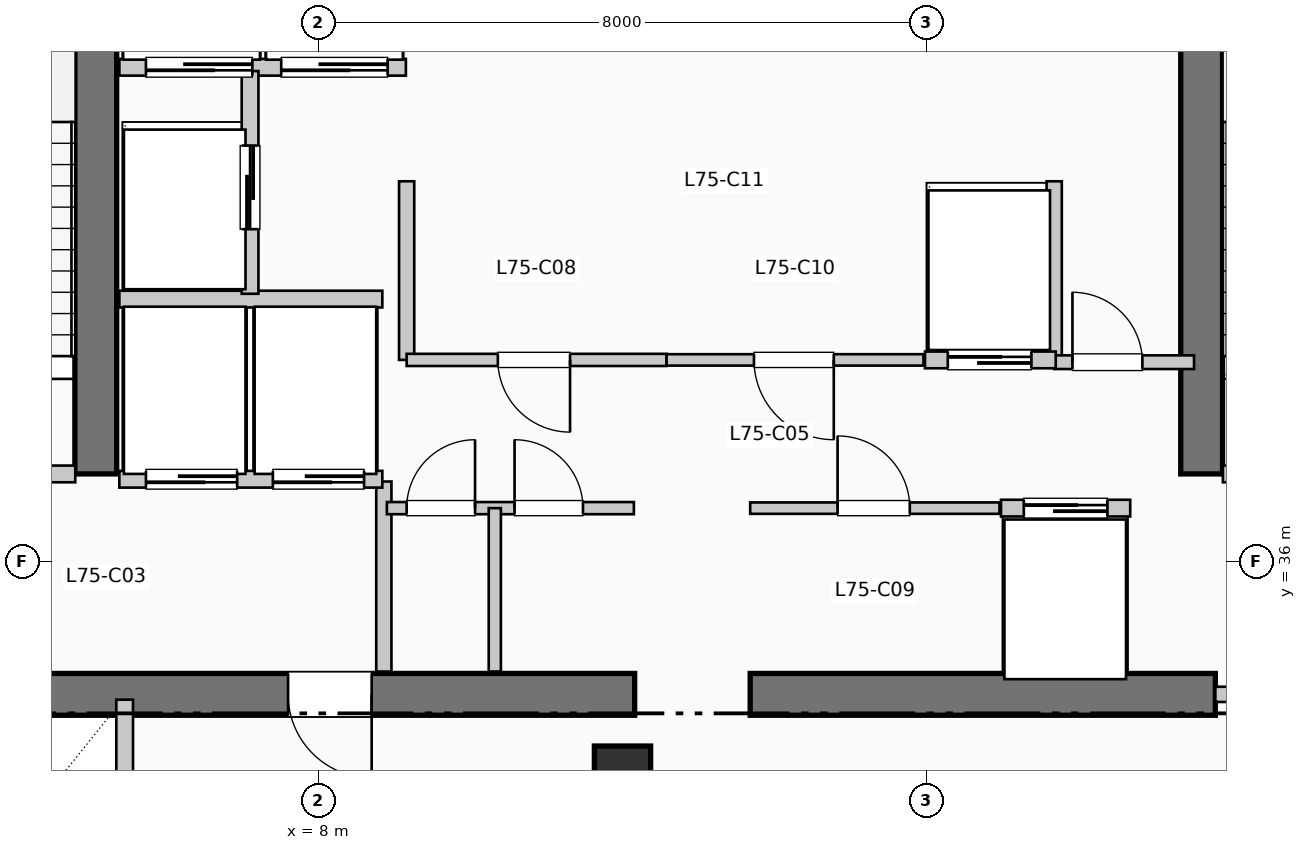
"""IFC4 building model, lengths in metres.
Left out: names, types, materials, properties, quantities, classifications, styles, units other than length and angle.
Written with IfcOpenShell. Run it as: python <this file> out.ifc"""

import sys

from ifc_helpers import new_model, si_unit, direction, frame, frame_2d, origin, origin_2d, place, context, subcontext, project, spatial, rectangle, extrude, element, fill, save


model = new_model("IFC4")
c1 = context("Model", 3, precision=1e-05, world=origin(), true_north=direction((0.0, 1.0)))
c2 = subcontext(c1, "Body", "Model", "MODEL_VIEW")
j1 = project(units=[si_unit("LENGTHUNIT", "METRE"), si_unit("PLANEANGLEUNIT", "RADIAN")], contexts=[c1])
p1 = place(None, origin())
s1 = spatial("IfcSite", under=j1, at=p1, CompositionType="ELEMENT")
p2 = place(p1, origin())
s2 = spatial("IfcBuilding", under=s1, at=p2, CompositionType="ELEMENT")
p3 = place(p2, frame((0.0, 0.0, 307.89)))
s3 = spatial("IfcBuildingStorey", under=s2, at=p3, CompositionType="ELEMENT", Elevation=307.89)
p4 = place(p3, frame((1.45, 34.25, 0.0), z_axis=(0.0, 0.0, 1.0), x_axis=(1.0, 0.0, 0.0)))
e1 = element("IfcWall", 1, at=p4, inside=s3, PredefinedType="SHEAR", context=c2, shape_type="SweptSolid", body=[
    extrude(rectangle(XDim=10.71, YDim=0.55, at=frame_2d((5.355, 0.0))), origin(), (0.0, 0.0, 1.0), 3.96),
])
p5 = place(p4, frame((7.25, 0.0, 0.0), z_axis=(0.0, 0.0, 1.0), x_axis=(-1.0, 0.0, 0.0)))
e2 = element("IfcOpeningElement", 2, at=p5, cuts=e1, PredefinedType="OPENING", context=c2, shape_type="SweptSolid", body=[
    extrude(rectangle(XDim=1.1, YDim=2.15, at=frame_2d((0.55, 1.075))), frame((0.0, 0.285, 0.0), z_axis=(0.0, -1.0, 0.0), x_axis=(1.0, 0.0, 0.0)), (0.0, 0.0, 1.0), 0.57),
])
p6 = place(p3, frame((13.68, 34.25, 0.0), z_axis=(0.0, 0.0, 1.0), x_axis=(1.0, 0.0, 0.0)))
e3 = element("IfcWall", 3, at=p6, inside=s3, PredefinedType="SHEAR", context=c2, shape_type="SweptSolid", body=[
    extrude(rectangle(XDim=6.12, YDim=0.55, at=frame_2d((3.06, 0.0))), origin(), (0.0, 0.0, 1.0), 3.96),
])
for number, where, z_axis, x_axis in (
    (4, (5.07, 37.15, 0.0), (0.0, 0.0, 1.0), (0.0, 1.0, 0.0)),
    (5, (19.62, 37.15, 0.0), (0.0, 0.0, 1.0), (0.0, 1.0, 0.0)),
):
    element("IfcWall", number, at=place(p3, frame(where, z_axis=z_axis, x_axis=x_axis)), inside=s3, PredefinedType="SHEAR", context=c2, shape_type="SweptSolid", body=[
        extrude(rectangle(XDim=7.89, YDim=0.55, at=frame_2d((3.945, 0.0))), origin(), (0.0, 0.0, 1.0), 3.96),
    ])
p7 = place(p3, frame((12.0, 33.2, 0.0), z_axis=(0.0, 0.0, 1.0), x_axis=(1.0, 0.0, 0.0)))
e6 = element("IfcColumn", 6, at=p7, inside=s3, PredefinedType="COLUMN", context=c2, shape_type="SweptSolid", body=[
    extrude(rectangle(XDim=0.74, YDim=0.74, at=origin_2d()), origin(), (0.0, 0.0, 1.0), 3.96),
])
p8 = place(p3, frame((1.65, 37.15, 0.0), z_axis=(0.0, 0.0, 1.0), x_axis=(1.0, 0.0, 0.0)))
e7 = element("IfcWall", 7, at=p8, inside=s3, PredefinedType="PARTITIONING", context=c2, shape_type="SweptSolid", body=[
    extrude(rectangle(XDim=3.15, YDim=0.22, at=frame_2d((1.575, 0.0))), origin(), (0.0, 0.0, 1.0), 3.74),
])
p9 = place(p8, frame((2.05, 0.0, 0.0), z_axis=(0.0, 0.0, 1.0), x_axis=(-1.0, 0.0, 0.0)))
e8 = element("IfcOpeningElement", 8, at=p9, cuts=e7, PredefinedType="OPENING", context=c2, shape_type="SweptSolid", body=[
    extrude(rectangle(XDim=1.05, YDim=2.15, at=frame_2d((0.525, 1.075))), frame((0.0, 0.12, 0.0), z_axis=(0.0, -1.0, 0.0), x_axis=(1.0, 0.0, 0.0)), (0.0, 0.0, 1.0), 0.24),
])
p10 = place(p3, frame((8.86, 34.55, 0.0), z_axis=(0.0, 0.0, 1.0), x_axis=(0.0, 1.0, 0.0)))
e9 = element("IfcWall", 9, at=p10, inside=s3, PredefinedType="PARTITIONING", context=c2, shape_type="SweptSolid", body=[
    extrude(rectangle(XDim=2.5, YDim=0.2, at=frame_2d((1.25, 0.0))), origin(), (0.0, 0.0, 1.0), 3.74),
])
p11 = place(p3, frame((19.9, 37.15, 0.0), z_axis=(0.0, 0.0, 1.0), x_axis=(1.0, 0.0, 0.0)))
e10 = element("IfcWall", 10, at=p11, inside=s3, PredefinedType="PARTITIONING", context=c2, shape_type="SweptSolid", body=[
    extrude(rectangle(XDim=3.15, YDim=0.22, at=frame_2d((1.575, 0.0))), origin(), (0.0, 0.0, 1.0), 3.74),
])
p12 = place(p11, frame((2.05, 0.0, 0.0), z_axis=(0.0, 0.0, 1.0), x_axis=(-1.0, 0.0, 0.0)))
e11 = element("IfcOpeningElement", 11, at=p12, cuts=e10, PredefinedType="OPENING", context=c2, shape_type="SweptSolid", body=[
    extrude(rectangle(XDim=1.05, YDim=2.15, at=frame_2d((0.525, 1.075))), frame((0.0, 0.12, 0.0), z_axis=(0.0, -1.0, 0.0), x_axis=(1.0, 0.0, 0.0)), (0.0, 0.0, 1.0), 0.24),
])
p13 = place(p3, frame((19.8, 34.25, 0.0), z_axis=(0.0, 0.0, 1.0), x_axis=(1.0, 0.0, 0.0)))
e12 = element("IfcWall", 12, at=p13, inside=s3, PredefinedType="PARTITIONING", context=c2, shape_type="SweptSolid", body=[
    extrude(rectangle(XDim=3.25, YDim=0.2, at=frame_2d((1.625, 0.0))), origin(), (0.0, 0.0, 1.0), 3.74),
])
p14 = place(p13, frame((2.15, 0.0, 0.0), z_axis=(0.0, 0.0, 1.0), x_axis=(-1.0, 0.0, 0.0)))
e13 = element("IfcOpeningElement", 13, at=p14, cuts=e12, PredefinedType="OPENING", context=c2, shape_type="SweptSolid", body=[
    extrude(rectangle(XDim=1.1, YDim=2.15, at=frame_2d((0.55, 1.075))), frame((0.0, 0.11, 0.0), z_axis=(0.0, -1.0, 0.0), x_axis=(1.0, 0.0, 0.0)), (0.0, 0.0, 1.0), 0.22),
])
p15 = place(p3, frame((5.38, 37.08, 0.0), z_axis=(0.0, 0.0, 1.0), x_axis=(1.0, 0.0, 0.0)))
e14 = element("IfcWall", 14, at=p15, inside=s3, PredefinedType="PARTITIONING", context=c2, shape_type="SweptSolid", body=[
    extrude(rectangle(XDim=3.46, YDim=0.22, at=frame_2d((1.73, 0.0))), origin(), (0.0, 0.0, 1.0), 3.74),
])
p16 = place(p15, frame((1.55, 0.0, 0.0), z_axis=(0.0, 0.0, 1.0), x_axis=(-1.0, 0.0, 0.0)))
e15 = element("IfcOpeningElement", 15, at=p16, cuts=e14, PredefinedType="OPENING", context=c2, shape_type="SweptSolid", body=[
    extrude(rectangle(XDim=1.2, YDim=2.2, at=frame_2d((0.6, 1.1))), frame((0.0, 0.12, 0.0), z_axis=(0.0, -1.0, 0.0), x_axis=(1.0, 0.0, 0.0)), (0.0, 0.0, 1.0), 0.24),
])
p17 = place(p15, frame((3.22, 0.0, 0.0), z_axis=(0.0, 0.0, 1.0), x_axis=(-1.0, 0.0, 0.0)))
e16 = element("IfcOpeningElement", 16, at=p17, cuts=e14, PredefinedType="OPENING", context=c2, shape_type="SweptSolid", body=[
    extrude(rectangle(XDim=1.2, YDim=2.2, at=frame_2d((0.6, 1.1))), frame((0.0, 0.12, 0.0), z_axis=(0.0, -1.0, 0.0), x_axis=(1.0, 0.0, 0.0)), (0.0, 0.0, 1.0), 0.24),
])
p18 = place(p3, frame((5.38, 39.45, 0.0), z_axis=(0.0, 0.0, 1.0), x_axis=(1.0, 0.0, 0.0)))
e17 = element("IfcWall", 17, at=p18, inside=s3, PredefinedType="PARTITIONING", context=c2, shape_type="SweptSolid", body=[
    extrude(rectangle(XDim=3.46, YDim=0.22, at=frame_2d((1.73, 0.0))), origin(), (0.0, 0.0, 1.0), 3.74),
])
p19 = place(p3, frame((5.38, 42.5, 0.0), z_axis=(0.0, 0.0, 1.0), x_axis=(1.0, 0.0, 0.0)))
e18 = element("IfcWall", 18, at=p19, inside=s3, PredefinedType="PARTITIONING", context=c2, shape_type="SweptSolid", body=[
    extrude(rectangle(XDim=3.77, YDim=0.22, at=frame_2d((1.885, 0.0))), origin(), (0.0, 0.0, 1.0), 3.74),
])
p20 = place(p19, frame((1.75, 0.0, 0.0), z_axis=(0.0, 0.0, 1.0), x_axis=(-1.0, 0.0, 0.0)))
e19 = element("IfcOpeningElement", 19, at=p20, cuts=e18, PredefinedType="OPENING", context=c2, shape_type="SweptSolid", body=[
    extrude(rectangle(XDim=1.4, YDim=2.2, at=frame_2d((0.7, 1.1))), frame((0.0, 0.12, 0.0), z_axis=(0.0, -1.0, 0.0), x_axis=(1.0, 0.0, 0.0)), (0.0, 0.0, 1.0), 0.24),
])
p21 = place(p19, frame((3.53, 0.0, 0.0), z_axis=(0.0, 0.0, 1.0), x_axis=(-1.0, 0.0, 0.0)))
e20 = element("IfcOpeningElement", 20, at=p21, cuts=e18, PredefinedType="OPENING", context=c2, shape_type="SweptSolid", body=[
    extrude(rectangle(XDim=1.4, YDim=2.2, at=frame_2d((0.7, 1.1))), frame((0.0, 0.12, 0.0), z_axis=(0.0, -1.0, 0.0), x_axis=(1.0, 0.0, 0.0)), (0.0, 0.0, 1.0), 0.24),
])
p22 = place(p3, frame((7.1, 39.52, 0.0), z_axis=(0.0, 0.0, 1.0), x_axis=(0.0, 1.0, 0.0)))
e21 = element("IfcWall", 21, at=p22, inside=s3, PredefinedType="PARTITIONING", context=c2, shape_type="SweptSolid", body=[
    extrude(rectangle(XDim=2.93, YDim=0.22, at=frame_2d((1.465, 0.0))), origin(), (0.0, 0.0, 1.0), 3.74),
])
p23 = place(p22, frame((0.85, 0.0, 0.0)))
e22 = element("IfcOpeningElement", 22, at=p23, cuts=e21, PredefinedType="OPENING", context=c2, shape_type="SweptSolid", body=[
    extrude(rectangle(XDim=1.1, YDim=2.2, at=frame_2d((0.55, 1.1))), frame((0.0, 0.12, 0.0), z_axis=(0.0, -1.0, 0.0), x_axis=(1.0, 0.0, 0.0)), (0.0, 0.0, 1.0), 0.24),
])
p24 = place(p3, frame((5.45, 31.8, 0.0), z_axis=(0.0, 0.0, 1.0), x_axis=(0.0, 1.0, 0.0)))
e23 = element("IfcWall", 23, at=p24, inside=s3, PredefinedType="PARTITIONING", context=c2, shape_type="SweptSolid", body=[
    extrude(rectangle(XDim=2.38, YDim=0.22, at=frame_2d((1.19, 0.0))), origin(), (0.0, 0.0, 1.0), 3.74),
])
for number, where, z_axis, x_axis in (
    (24, (9.16, 38.65, 0.0), (0.0, 0.0, 1.0), (0.0, 1.0, 0.0)),
    (25, (17.68, 38.65, 0.0), (0.0, 0.0, 1.0), (0.0, 1.0, 0.0)),
):
    element("IfcWall", number, at=place(p3, frame(where, z_axis=z_axis, x_axis=x_axis)), inside=s3, PredefinedType="PARTITIONING", context=c2, shape_type="SweptSolid", body=[
        extrude(rectangle(XDim=2.35, YDim=0.2, at=frame_2d((1.175, 0.0))), origin(), (0.0, 0.0, 1.0), 3.74),
    ])
p25 = place(p3, frame((17.68, 38.62, 0.0), z_axis=(0.0, 0.0, 1.0), x_axis=(1.0, 0.0, 0.0)))
e26 = element("IfcWall", 26, at=p25, inside=s3, PredefinedType="PARTITIONING", context=c2, shape_type="SweptSolid", body=[
    extrude(rectangle(XDim=1.84, YDim=0.18, at=frame_2d((0.92, 0.0))), origin(), (0.0, 0.0, 1.0), 3.74),
])
p26 = place(p25, frame((0.24, 0.0, 0.0)))
e27 = element("IfcOpeningElement", 27, at=p26, cuts=e26, PredefinedType="OPENING", context=c2, shape_type="SweptSolid", body=[
    extrude(rectangle(XDim=0.92, YDim=2.1, at=frame_2d((0.46, 1.05))), frame((0.0, 0.1, 0.0), z_axis=(0.0, -1.0, 0.0), x_axis=(1.0, 0.0, 0.0)), (0.0, 0.0, 1.0), 0.2),
])
p27 = place(p3, frame((8.9, 36.7, 0.0), z_axis=(0.0, 0.0, 1.0), x_axis=(1.0, 0.0, 0.0)))
e28 = element("IfcWall", 28, at=p27, inside=s3, PredefinedType="PARTITIONING", context=c2, shape_type="SweptSolid", body=[
    extrude(rectangle(XDim=3.25, YDim=0.16, at=frame_2d((1.625, 0.0))), origin(), (0.0, 0.0, 1.0), 3.74),
])
p28 = place(p27, frame((0.26, 0.0, 0.0)))
e29 = element("IfcOpeningElement", 29, at=p28, cuts=e28, PredefinedType="OPENING", context=c2, shape_type="SweptSolid", body=[
    extrude(rectangle(XDim=0.9, YDim=2.15, at=frame_2d((0.45, 1.075))), frame((0.0, 0.09, 0.0), z_axis=(0.0, -1.0, 0.0), x_axis=(1.0, 0.0, 0.0)), (0.0, 0.0, 1.0), 0.18),
])
p29 = place(p27, frame((1.68, 0.0, 0.0)))
e30 = element("IfcOpeningElement", 30, at=p29, cuts=e28, PredefinedType="OPENING", context=c2, shape_type="SweptSolid", body=[
    extrude(rectangle(XDim=0.9, YDim=2.15, at=frame_2d((0.45, 1.075))), frame((0.0, 0.09, 0.0), z_axis=(0.0, -1.0, 0.0), x_axis=(1.0, 0.0, 0.0)), (0.0, 0.0, 1.0), 0.18),
])
p30 = place(p3, frame((10.32, 34.55, 0.0), z_axis=(0.0, 0.0, 1.0), x_axis=(0.0, 1.0, 0.0)))
e31 = element("IfcWall", 31, at=p30, inside=s3, PredefinedType="PARTITIONING", context=c2, shape_type="SweptSolid", body=[
    extrude(rectangle(XDim=2.15, YDim=0.16, at=frame_2d((1.075, 0.0))), origin(), (0.0, 0.0, 1.0), 3.74),
])
p31 = place(p3, frame((9.16, 38.65, 0.0), z_axis=(0.0, 0.0, 1.0), x_axis=(1.0, 0.0, 0.0)))
e32 = element("IfcWall", 32, at=p31, inside=s3, PredefinedType="PARTITIONING", context=c2, shape_type="SweptSolid", body=[
    extrude(rectangle(XDim=3.42, YDim=0.16, at=frame_2d((1.71, 0.0))), origin(), (0.0, 0.0, 1.0), 3.74),
])
p32 = place(p31, frame((2.15, 0.0, 0.0), z_axis=(0.0, 0.0, 1.0), x_axis=(-1.0, 0.0, 0.0)))
e33 = element("IfcOpeningElement", 33, at=p32, cuts=e32, PredefinedType="OPENING", context=c2, shape_type="SweptSolid", body=[
    extrude(rectangle(XDim=0.95, YDim=2.15, at=frame_2d((0.475, 1.075))), frame((0.0, 0.09, 0.0), z_axis=(0.0, -1.0, 0.0), x_axis=(1.0, 0.0, 0.0)), (0.0, 0.0, 1.0), 0.18),
])
p33 = place(p3, frame((13.68, 36.7, 0.0), z_axis=(0.0, 0.0, 1.0), x_axis=(1.0, 0.0, 0.0)))
e34 = element("IfcWall", 34, at=p33, inside=s3, PredefinedType="PARTITIONING", context=c2, shape_type="SweptSolid", body=[
    extrude(rectangle(XDim=3.28, YDim=0.15, at=frame_2d((1.64, 0.0))), origin(), (0.0, 0.0, 1.0), 3.74),
])
p34 = place(p33, frame((1.15, 0.0, 0.0)))
e35 = element("IfcOpeningElement", 35, at=p34, cuts=e34, PredefinedType="OPENING", context=c2, shape_type="SweptSolid", body=[
    extrude(rectangle(XDim=0.95, YDim=2.15, at=frame_2d((0.475, 1.075))), frame((0.0, 0.085, 0.0), z_axis=(0.0, -1.0, 0.0), x_axis=(1.0, 0.0, 0.0)), (0.0, 0.0, 1.0), 0.17),
])
p35 = place(p3, frame((12.58, 38.65, 0.0), z_axis=(0.0, 0.0, 1.0), x_axis=(1.0, 0.0, 0.0)))
e36 = element("IfcWall", 36, at=p35, inside=s3, PredefinedType="PARTITIONING", context=c2, shape_type="SweptSolid", body=[
    extrude(rectangle(XDim=3.38, YDim=0.15, at=frame_2d((1.69, 0.0))), origin(), (0.0, 0.0, 1.0), 3.74),
])
p36 = place(p35, frame((2.2, 0.0, 0.0), z_axis=(0.0, 0.0, 1.0), x_axis=(-1.0, 0.0, 0.0)))
e37 = element("IfcOpeningElement", 37, at=p36, cuts=e36, PredefinedType="OPENING", context=c2, shape_type="SweptSolid", body=[
    extrude(rectangle(XDim=1.05, YDim=2.15, at=frame_2d((0.525, 1.075))), frame((0.0, 0.085, 0.0), z_axis=(0.0, -1.0, 0.0), x_axis=(1.0, 0.0, 0.0)), (0.0, 0.0, 1.0), 0.17),
])
p37 = place(p3, frame((16.98, 36.7, 0.0), z_axis=(0.0, 0.0, 1.0), x_axis=(1.0, 0.0, 0.0)))
e38 = element("IfcWall", 38, at=p37, inside=s3, PredefinedType="PARTITIONING", context=c2, shape_type="SweptSolid", body=[
    extrude(rectangle(XDim=1.7, YDim=0.22, at=frame_2d((0.85, 0.0))), origin(), (0.0, 0.0, 1.0), 3.74),
])
p38 = place(p37, frame((0.3, 0.0, 0.0)))
e39 = element("IfcOpeningElement", 39, at=p38, cuts=e38, PredefinedType="OPENING", context=c2, shape_type="SweptSolid", body=[
    extrude(rectangle(XDim=1.1, YDim=2.2, at=frame_2d((0.55, 1.1))), frame((0.0, 0.12, 0.0), z_axis=(0.0, -1.0, 0.0), x_axis=(1.0, 0.0, 0.0)), (0.0, 0.0, 1.0), 0.24),
])
p39 = place(p3, frame((15.98, 38.65, 0.0), z_axis=(0.0, 0.0, 1.0), x_axis=(1.0, 0.0, 0.0)))
e40 = element("IfcWall", 40, at=p39, inside=s3, PredefinedType="PARTITIONING", context=c2, shape_type="SweptSolid", body=[
    extrude(rectangle(XDim=1.72, YDim=0.22, at=frame_2d((0.86, 0.0))), origin(), (0.0, 0.0, 1.0), 3.74),
])
p40 = place(p39, frame((0.3, 0.0, 0.0)))
e41 = element("IfcOpeningElement", 41, at=p40, cuts=e40, PredefinedType="OPENING", context=c2, shape_type="SweptSolid", body=[
    extrude(rectangle(XDim=1.1, YDim=2.2, at=frame_2d((0.55, 1.1))), frame((0.0, 0.12, 0.0), z_axis=(0.0, -1.0, 0.0), x_axis=(1.0, 0.0, 0.0)), (0.0, 0.0, 1.0), 0.24),
])
p41 = place(p5, origin())
e42 = element("IfcDoor", 42, at=p41, inside=s3, OperationType="SINGLE_SWING_RIGHT", PredefinedType="DOOR", context=c2, shape_type="SweptSolid", body=[
    extrude(rectangle(XDim=1.1, YDim=2.15, at=frame_2d((0.55, 1.075))), frame((0.0, 0.025, 0.0), z_axis=(0.0, -1.0, 0.0), x_axis=(1.0, 0.0, 0.0)), (0.0, 0.0, 1.0), 0.05),
])
fill(e2, e42)
p42 = place(p16, origin())
e43 = element("IfcDoor", 43, at=p42, inside=s3, OperationType="SLIDING_TO_RIGHT", PredefinedType="DOOR", context=c2, shape_type="SweptSolid", body=[
    extrude(rectangle(XDim=1.2, YDim=2.2, at=frame_2d((0.6, 1.1))), frame((0.0, 0.025, 0.0), z_axis=(0.0, -1.0, 0.0), x_axis=(1.0, 0.0, 0.0)), (0.0, 0.0, 1.0), 0.05),
])
fill(e15, e43)
p43 = place(p17, origin())
e44 = element("IfcDoor", 44, at=p43, inside=s3, OperationType="SLIDING_TO_RIGHT", PredefinedType="DOOR", context=c2, shape_type="SweptSolid", body=[
    extrude(rectangle(XDim=1.2, YDim=2.2, at=frame_2d((0.6, 1.1))), frame((0.0, 0.025, 0.0), z_axis=(0.0, -1.0, 0.0), x_axis=(1.0, 0.0, 0.0)), (0.0, 0.0, 1.0), 0.05),
])
fill(e16, e44)
p44 = place(p20, origin())
e45 = element("IfcDoor", 45, at=p44, inside=s3, OperationType="SLIDING_TO_LEFT", PredefinedType="DOOR", context=c2, shape_type="SweptSolid", body=[
    extrude(rectangle(XDim=1.4, YDim=2.2, at=frame_2d((0.7, 1.1))), frame((0.0, 0.025, 0.0), z_axis=(0.0, -1.0, 0.0), x_axis=(1.0, 0.0, 0.0)), (0.0, 0.0, 1.0), 0.05),
])
fill(e19, e45)
p45 = place(p21, origin())
e46 = element("IfcDoor", 46, at=p45, inside=s3, OperationType="SLIDING_TO_LEFT", PredefinedType="DOOR", context=c2, shape_type="SweptSolid", body=[
    extrude(rectangle(XDim=1.4, YDim=2.2, at=frame_2d((0.7, 1.1))), frame((0.0, 0.025, 0.0), z_axis=(0.0, -1.0, 0.0), x_axis=(1.0, 0.0, 0.0)), (0.0, 0.0, 1.0), 0.05),
])
fill(e20, e46)
p46 = place(p23, origin())
e47 = element("IfcDoor", 47, at=p46, inside=s3, OperationType="SLIDING_TO_LEFT", PredefinedType="DOOR", context=c2, shape_type="SweptSolid", body=[
    extrude(rectangle(XDim=1.1, YDim=2.2, at=frame_2d((0.55, 1.1))), frame((0.0, 0.025, 0.0), z_axis=(0.0, -1.0, 0.0), x_axis=(1.0, 0.0, 0.0)), (0.0, 0.0, 1.0), 0.05),
])
fill(e22, e47)
p47 = place(p26, origin())
e48 = element("IfcDoor", 48, at=p47, inside=s3, OperationType="SINGLE_SWING_LEFT", PredefinedType="DOOR", context=c2, shape_type="SweptSolid", body=[
    extrude(rectangle(XDim=0.92, YDim=2.1, at=frame_2d((0.46, 1.05))), frame((0.0, 0.025, 0.0), z_axis=(0.0, -1.0, 0.0), x_axis=(1.0, 0.0, 0.0)), (0.0, 0.0, 1.0), 0.05),
])
fill(e27, e48)
p48 = place(p28, origin())
e49 = element("IfcDoor", 49, at=p48, inside=s3, OperationType="SINGLE_SWING_RIGHT", PredefinedType="DOOR", context=c2, shape_type="SweptSolid", body=[
    extrude(rectangle(XDim=0.9, YDim=2.15, at=frame_2d((0.45, 1.075))), frame((0.0, 0.025, 0.0), z_axis=(0.0, -1.0, 0.0), x_axis=(1.0, 0.0, 0.0)), (0.0, 0.0, 1.0), 0.05),
])
fill(e29, e49)
p49 = place(p29, origin())
e50 = element("IfcDoor", 50, at=p49, inside=s3, OperationType="SINGLE_SWING_LEFT", PredefinedType="DOOR", context=c2, shape_type="SweptSolid", body=[
    extrude(rectangle(XDim=0.9, YDim=2.15, at=frame_2d((0.45, 1.075))), frame((0.0, 0.025, 0.0), z_axis=(0.0, -1.0, 0.0), x_axis=(1.0, 0.0, 0.0)), (0.0, 0.0, 1.0), 0.05),
])
fill(e30, e50)
p50 = place(p32, origin())
e51 = element("IfcDoor", 51, at=p50, inside=s3, OperationType="SINGLE_SWING_RIGHT", PredefinedType="DOOR", context=c2, shape_type="SweptSolid", body=[
    extrude(rectangle(XDim=0.95, YDim=2.15, at=frame_2d((0.475, 1.075))), frame((0.0, 0.025, 0.0), z_axis=(0.0, -1.0, 0.0), x_axis=(1.0, 0.0, 0.0)), (0.0, 0.0, 1.0), 0.05),
])
fill(e33, e51)
p51 = place(p34, origin())
e52 = element("IfcDoor", 52, at=p51, inside=s3, OperationType="SINGLE_SWING_LEFT", PredefinedType="DOOR", context=c2, shape_type="SweptSolid", body=[
    extrude(rectangle(XDim=0.95, YDim=2.15, at=frame_2d((0.475, 1.075))), frame((0.0, 0.025, 0.0), z_axis=(0.0, -1.0, 0.0), x_axis=(1.0, 0.0, 0.0)), (0.0, 0.0, 1.0), 0.05),
])
fill(e35, e52)
p52 = place(p36, origin())
e53 = element("IfcDoor", 53, at=p52, inside=s3, OperationType="SINGLE_SWING_RIGHT", PredefinedType="DOOR", context=c2, shape_type="SweptSolid", body=[
    extrude(rectangle(XDim=1.05, YDim=2.15, at=frame_2d((0.525, 1.075))), frame((0.0, 0.025, 0.0), z_axis=(0.0, -1.0, 0.0), x_axis=(1.0, 0.0, 0.0)), (0.0, 0.0, 1.0), 0.05),
])
fill(e37, e53)
p53 = place(p38, origin())
e54 = element("IfcDoor", 54, at=p53, inside=s3, OperationType="SLIDING_TO_LEFT", PredefinedType="DOOR", context=c2, shape_type="SweptSolid", body=[
    extrude(rectangle(XDim=1.1, YDim=2.2, at=frame_2d((0.55, 1.1))), frame((0.0, 0.025, 0.0), z_axis=(0.0, -1.0, 0.0), x_axis=(1.0, 0.0, 0.0)), (0.0, 0.0, 1.0), 0.05),
])
fill(e39, e54)
p54 = place(p40, origin())
e55 = element("IfcDoor", 55, at=p54, inside=s3, OperationType="SLIDING_TO_LEFT", PredefinedType="DOOR", context=c2, shape_type="SweptSolid", body=[
    extrude(rectangle(XDim=1.1, YDim=2.2, at=frame_2d((0.55, 1.1))), frame((0.0, 0.025, 0.0), z_axis=(0.0, -1.0, 0.0), x_axis=(1.0, 0.0, 0.0)), (0.0, 0.0, 1.0), 0.05),
])
fill(e41, e55)
save(model, sys.argv[1])
